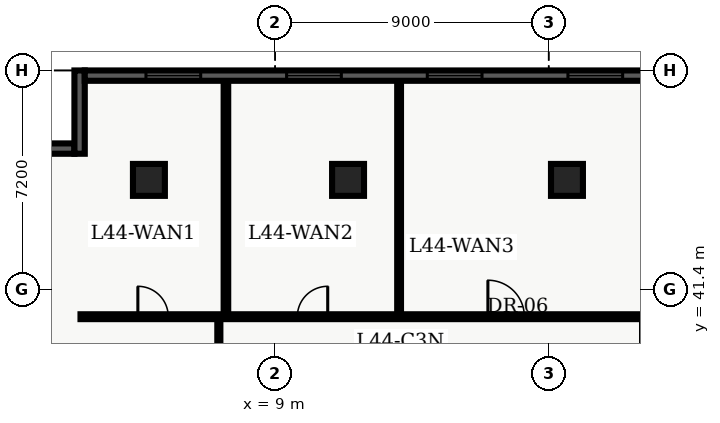
"""IFC4 building model, lengths in metres.
Left out: names, types, materials, properties, quantities, classifications, styles, units other than length and angle.
Written with IfcOpenShell. Run it as: python <this file> out.ifc"""

import sys

from ifc_helpers import new_model, entity, si_unit, converted_unit, direction, frame, origin_with_axes, origin_2d_with_axis, place, context, subcontext, project, spatial, polyline, rectangle, outline, extrude, element, fill, save


model = new_model("IFC4")
c1 = context("Model", 3, precision=1e-05, world=origin_with_axes(), true_north=direction((0.0, 1.0)))
c2 = subcontext(c1, "Body", "Model", "MODEL_VIEW")
j1 = project(units=[si_unit("LENGTHUNIT", "METRE"), converted_unit("PLANEANGLEUNIT", "DEGREE", entity("IfcPlaneAngleMeasure", 0.017), si_unit("PLANEANGLEUNIT", "RADIAN"), dimensions=[0, 0, 0, 0, 0, 0, 0])], contexts=[c1])
p1 = place(None, origin_with_axes())
s1 = spatial("IfcSite", under=j1, at=p1, CompositionType="ELEMENT")
p2 = place(p1, origin_with_axes())
s2 = spatial("IfcBuilding", under=s1, at=p2, CompositionType="ELEMENT")
p3 = place(p2, frame((0.0, 0.0, 179.7), z_axis=(0.0, 0.0, 1.0), x_axis=(1.0, 0.0, 0.0)))
s3 = spatial("IfcBuildingStorey", under=s2, at=p3, CompositionType="ELEMENT", Elevation=179.7)
for number, where, z_axis, x_axis in (
    (1, (11.4, 45.0, 0.0), (0.0, 0.0, 1.0), (1.0, 0.0, 0.0)),
    (2, (18.6, 45.0, 0.0), (0.0, 0.0, 1.0), (1.0, 0.0, 0.0)),
    (3, (4.85, 45.0, 0.0), (0.0, 0.0, 1.0), (1.0, 0.0, 0.0)),
):
    element("IfcColumn", number, at=place(p3, frame(where, z_axis=z_axis, x_axis=x_axis)), inside=s3, PredefinedType="COLUMN", context=c2, shape_type="SweptSolid", body=[
        extrude(rectangle(XDim=1.05, YDim=1.05, at=origin_2d_with_axis()), origin_with_axes(), (0.0, 0.0, 1.0), 3.9),
    ])
p4 = place(p3, frame((2.6, 40.5, 0.0), z_axis=(0.0, 0.0, 1.0), x_axis=(1.0, 0.0, 0.0)))
e4 = element("IfcWall", 4, at=p4, inside=s3, PredefinedType="PARTITIONING", context=c2, shape_type="SweptSolid", body=[
    extrude(outline(polyline([(0.0, -0.08), (22.87, -0.08), (22.87, 0.08), (0.0, 0.08), (0.0, -0.08)])), origin_with_axes(), (0.0, 0.0, 1.0), 2.7),
])
p5 = place(p4, frame((2.386, 0.0, 0.0), z_axis=(0.0, 0.0, 1.0), x_axis=(1.0, 0.0, 0.0)))
e5 = element("IfcOpeningElement", 5, at=p5, cuts=e4, PredefinedType="OPENING", context=c2, shape_type="SweptSolid", body=[
    extrude(rectangle(XDim=1.0, YDim=0.18, at=origin_2d_with_axis()), origin_with_axes(), (0.0, 0.0, 1.0), 2.15),
])
p6 = place(p4, frame((7.631, 0.0, 0.0), z_axis=(0.0, 0.0, 1.0), x_axis=(1.0, 0.0, 0.0)))
e6 = element("IfcOpeningElement", 6, at=p6, cuts=e4, PredefinedType="OPENING", context=c2, shape_type="SweptSolid", body=[
    extrude(rectangle(XDim=1.0, YDim=0.18, at=origin_2d_with_axis()), origin_with_axes(), (0.0, 0.0, 1.0), 2.15),
])
p7 = place(p4, frame((13.999, 0.0, 0.0), z_axis=(0.0, 0.0, 1.0), x_axis=(1.0, 0.0, 0.0)))
e7 = element("IfcOpeningElement", 7, at=p7, cuts=e4, PredefinedType="OPENING", context=c2, shape_type="SweptSolid", body=[
    extrude(rectangle(XDim=1.2, YDim=0.18, at=origin_2d_with_axis()), origin_with_axes(), (0.0, 0.0, 1.0), 2.2),
])
p8 = place(p3, frame((7.15, 7.8, 0.0), z_axis=(0.0, 0.0, 1.0), x_axis=(0.0, 1.0, 0.0)))
e8 = element("IfcWall", 8, at=p8, inside=s3, PredefinedType="PARTITIONING", context=c2, shape_type="SweptSolid", body=[
    extrude(outline(polyline([(0.0, -0.05), (32.7, -0.05), (32.7, 0.05), (0.0, 0.05), (0.0, -0.05)])), origin_with_axes(), (0.0, 0.0, 1.0), 2.7),
])
p9 = place(p8, frame((7.098, 0.0, 0.0), z_axis=(0.0, 0.0, 1.0), x_axis=(1.0, 0.0, 0.0)))
e9 = element("IfcOpeningElement", 9, at=p9, cuts=e8, PredefinedType="OPENING", context=c2, shape_type="SweptSolid", body=[
    extrude(rectangle(XDim=1.0, YDim=0.12, at=origin_2d_with_axis()), origin_with_axes(), (0.0, 0.0, 1.0), 2.15),
])
p10 = place(p8, frame((23.317, 0.0, 0.0), z_axis=(0.0, 0.0, 1.0), x_axis=(1.0, 0.0, 0.0)))
e10 = element("IfcOpeningElement", 10, at=p10, cuts=e8, PredefinedType="OPENING", context=c2, shape_type="SweptSolid", body=[
    extrude(rectangle(XDim=1.0, YDim=0.12, at=origin_2d_with_axis()), origin_with_axes(), (0.0, 0.0, 1.0), 2.15),
])
p11 = place(p3, frame((7.383, 40.6, 0.0), z_axis=(0.0, 0.0, 1.0), x_axis=(0.0, 1.0, 0.0)))
e11 = element("IfcWall", 11, at=p11, inside=s3, PredefinedType="PARTITIONING", context=c2, shape_type="SweptSolid", body=[
    extrude(outline(polyline([(0.0, -0.075), (7.665, -0.075), (7.665, 0.075), (0.0, 0.075), (0.0, -0.075)])), origin_with_axes(), (0.0, 0.0, 1.0), 2.7),
])
p12 = place(p3, frame((13.079, 40.6, 0.0), z_axis=(0.0, 0.0, 1.0), x_axis=(0.0, 1.0, 0.0)))
e12 = element("IfcWall", 12, at=p12, inside=s3, PredefinedType="PARTITIONING", context=c2, shape_type="SweptSolid", body=[
    extrude(outline(polyline([(0.0, -0.062), (7.665, -0.062), (7.665, 0.062), (0.0, 0.062), (0.0, -0.062)])), origin_with_axes(), (0.0, 0.0, 1.0), 2.7),
])
p13 = place(p3, frame((0.34, 46.03, 0.0), z_axis=(0.0, 0.0, 1.0), x_axis=(1.0, 0.0, 0.0)))
e13 = element("IfcWall", 13, at=p13, inside=s3, PredefinedType="SOLIDWALL", context=c2, shape_type="SweptSolid", body=[
    extrude(outline(polyline([(0.0, -0.17), (2.06, -0.17), (2.06, 0.17), (0.0, 0.17), (0.0, -0.17)])), origin_with_axes(), (0.0, 0.0, 1.0), 3.66),
])
p14 = place(p3, frame((2.57, 45.86, 0.0), z_axis=(0.0, 0.0, 1.0), x_axis=(0.0, 1.0, 0.0)))
e14 = element("IfcWall", 14, at=p14, inside=s3, PredefinedType="SOLIDWALL", context=c2, shape_type="SweptSolid", body=[
    extrude(outline(polyline([(0.0, -0.17), (2.74, -0.17), (2.74, 0.17), (0.0, 0.17), (0.0, -0.17)])), origin_with_axes(), (0.0, 0.0, 1.0), 3.66),
])
p15 = place(p3, frame((2.74, 48.43, 0.0), z_axis=(0.0, 0.0, 1.0), x_axis=(1.0, 0.0, 0.0)))
e15 = element("IfcWall", 15, at=p15, inside=s3, PredefinedType="SOLIDWALL", context=c2, shape_type="SweptSolid", body=[
    extrude(outline(polyline([(0.0, -0.17), (19.705, -0.17), (19.705, 0.17), (0.0, 0.17), (0.0, -0.17)])), origin_with_axes(), (0.0, 0.0, 1.0), 3.66),
])
p16 = place(p15, frame((2.913, 0.0, 0.45), z_axis=(0.0, 0.0, 1.0), x_axis=(1.0, 0.0, 0.0)))
e16 = element("IfcOpeningElement", 16, at=p16, cuts=e15, PredefinedType="OPENING", context=c2, shape_type="SweptSolid", body=[
    extrude(rectangle(XDim=1.8, YDim=0.36, at=origin_2d_with_axis()), origin_with_axes(), (0.0, 0.0, 1.0), 2.1),
])
p17 = place(p15, frame((7.539, 0.0, 0.45), z_axis=(0.0, 0.0, 1.0), x_axis=(1.0, 0.0, 0.0)))
e17 = element("IfcOpeningElement", 17, at=p17, cuts=e15, PredefinedType="OPENING", context=c2, shape_type="SweptSolid", body=[
    extrude(rectangle(XDim=1.8, YDim=0.36, at=origin_2d_with_axis()), origin_with_axes(), (0.0, 0.0, 1.0), 2.1),
])
p18 = place(p15, frame((12.166, 0.0, 0.45), z_axis=(0.0, 0.0, 1.0), x_axis=(1.0, 0.0, 0.0)))
e18 = element("IfcOpeningElement", 18, at=p18, cuts=e15, PredefinedType="OPENING", context=c2, shape_type="SweptSolid", body=[
    extrude(rectangle(XDim=1.8, YDim=0.36, at=origin_2d_with_axis()), origin_with_axes(), (0.0, 0.0, 1.0), 2.1),
])
p19 = place(p15, frame((16.792, 0.0, 0.45), z_axis=(0.0, 0.0, 1.0), x_axis=(1.0, 0.0, 0.0)))
e19 = element("IfcOpeningElement", 19, at=p19, cuts=e15, PredefinedType="OPENING", context=c2, shape_type="SweptSolid", body=[
    extrude(rectangle(XDim=1.8, YDim=0.36, at=origin_2d_with_axis()), origin_with_axes(), (0.0, 0.0, 1.0), 2.1),
])
p20 = place(p4, frame((2.386, 0.0, 0.0), z_axis=(0.0, 0.0, 1.0), x_axis=(1.0, 0.0, 0.0)))
e20 = element("IfcDoor", 20, at=p20, inside=s3, OperationType="SINGLE_SWING_LEFT", PredefinedType="DOOR", context=c2, shape_type="SweptSolid", body=[
    extrude(rectangle(XDim=1.0, YDim=0.09, at=origin_2d_with_axis()), origin_with_axes(), (0.0, 0.0, 1.0), 2.15),
])
fill(e5, e20)
p21 = place(p4, frame((7.631, 0.0, 0.0), z_axis=(0.0, 0.0, 1.0), x_axis=(1.0, 0.0, 0.0)))
e21 = element("IfcDoor", 21, at=p21, inside=s3, OperationType="SINGLE_SWING_RIGHT", PredefinedType="DOOR", context=c2, shape_type="SweptSolid", body=[
    extrude(rectangle(XDim=1.0, YDim=0.09, at=origin_2d_with_axis()), origin_with_axes(), (0.0, 0.0, 1.0), 2.15),
])
fill(e6, e21)
p22 = place(p4, frame((13.999, 0.0, 0.0), z_axis=(0.0, 0.0, 1.0), x_axis=(1.0, 0.0, 0.0)))
e22 = element("IfcDoor", 22, at=p22, inside=s3, OperationType="SINGLE_SWING_LEFT", PredefinedType="DOOR", context=c2, shape_type="SweptSolid", body=[
    extrude(rectangle(XDim=1.2, YDim=0.09, at=origin_2d_with_axis()), origin_with_axes(), (0.0, 0.0, 1.0), 2.2),
])
fill(e7, e22)
p23 = place(p15, frame((2.913, 0.0, 0.45), z_axis=(0.0, 0.0, 1.0), x_axis=(1.0, 0.0, 0.0)))
e23 = element("IfcWindow", 23, at=p23, inside=s3, PredefinedType="WINDOW", context=c2, shape_type="SweptSolid", body=[
    extrude(rectangle(XDim=1.8, YDim=0.09, at=origin_2d_with_axis()), origin_with_axes(), (0.0, 0.0, 1.0), 2.1),
])
fill(e16, e23)
p24 = place(p15, frame((7.539, 0.0, 0.45), z_axis=(0.0, 0.0, 1.0), x_axis=(1.0, 0.0, 0.0)))
e24 = element("IfcWindow", 24, at=p24, inside=s3, PredefinedType="WINDOW", context=c2, shape_type="SweptSolid", body=[
    extrude(rectangle(XDim=1.8, YDim=0.09, at=origin_2d_with_axis()), origin_with_axes(), (0.0, 0.0, 1.0), 2.1),
])
fill(e17, e24)
p25 = place(p15, frame((12.166, 0.0, 0.45), z_axis=(0.0, 0.0, 1.0), x_axis=(1.0, 0.0, 0.0)))
e25 = element("IfcWindow", 25, at=p25, inside=s3, PredefinedType="WINDOW", context=c2, shape_type="SweptSolid", body=[
    extrude(rectangle(XDim=1.8, YDim=0.09, at=origin_2d_with_axis()), origin_with_axes(), (0.0, 0.0, 1.0), 2.1),
])
fill(e18, e25)
p26 = place(p15, frame((16.792, 0.0, 0.45), z_axis=(0.0, 0.0, 1.0), x_axis=(1.0, 0.0, 0.0)))
e26 = element("IfcWindow", 26, at=p26, inside=s3, PredefinedType="WINDOW", context=c2, shape_type="SweptSolid", body=[
    extrude(rectangle(XDim=1.8, YDim=0.09, at=origin_2d_with_axis()), origin_with_axes(), (0.0, 0.0, 1.0), 2.1),
])
fill(e19, e26)
save(model, sys.argv[1])
